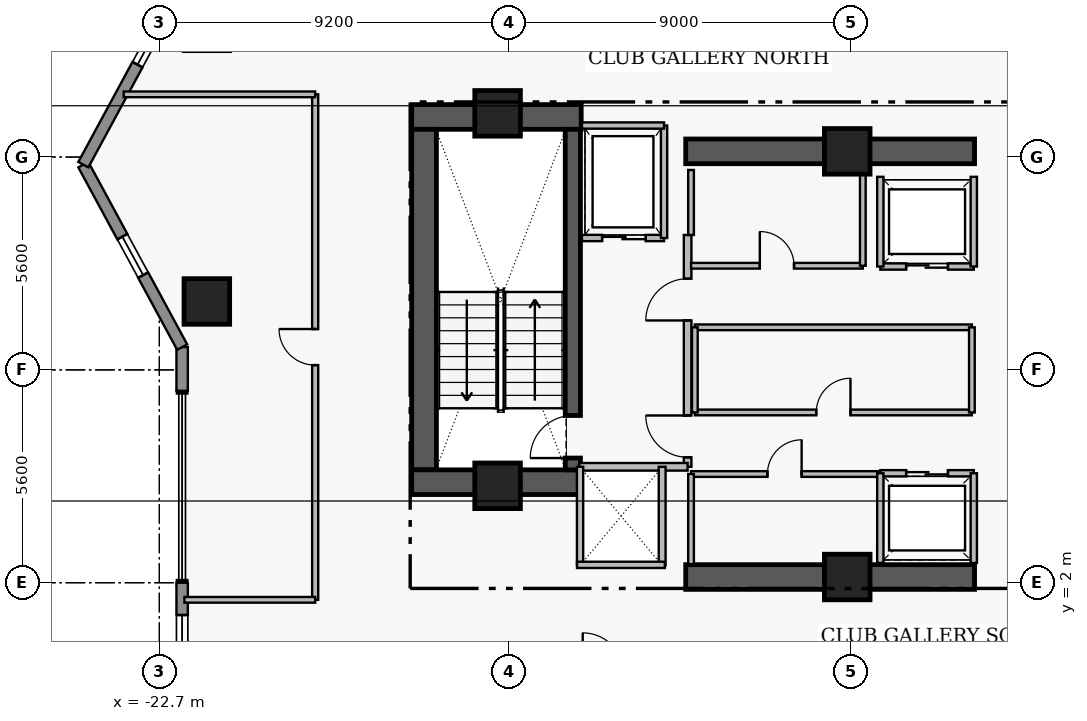
"""IFC4 building model, lengths in metres.
Left out: names, types, materials, properties, quantities, classifications, styles, units other than length and angle.
Written with IfcOpenShell. Run it as: python <this file> out.ifc"""

import sys

from ifc_helpers import new_model, si_unit, direction, frame, frame_2d, origin, origin_2d, place, context, subcontext, project, spatial, rectangle, extrude, element, fill, save


model = new_model("IFC4")
c1 = context("Model", 3, precision=1e-05, world=origin(), true_north=direction((0.0, 1.0)))
c2 = subcontext(c1, "Body", "Model", "MODEL_VIEW")
j1 = project(units=[si_unit("LENGTHUNIT", "METRE"), si_unit("PLANEANGLEUNIT", "RADIAN")], contexts=[c1])
p1 = place(None, origin())
s1 = spatial("IfcSite", under=j1, at=p1, CompositionType="ELEMENT")
p2 = place(p1, origin())
s2 = spatial("IfcBuilding", under=s1, at=p2, CompositionType="ELEMENT")
p3 = place(p2, frame((0.0, 0.0, 214.9)))
s3 = spatial("IfcBuildingStorey", under=s2, at=p3, CompositionType="ELEMENT", Elevation=214.9)
p4 = place(p3, frame((-16.06, 14.255, 0.0), z_axis=(0.0, 0.0, 1.0), x_axis=(1.0, 0.0, 0.0)))
e1 = element("IfcWall", 1, at=p4, inside=s3, PredefinedType="SHEAR", context=c2, shape_type="SweptSolid", body=[
    extrude(rectangle(XDim=4.46, YDim=0.65, at=frame_2d((2.23, 0.0))), origin(), (0.0, 0.0, 1.0), 3.56),
])
p5 = place(p3, frame((-15.735, 4.97, 0.0), z_axis=(0.0, 0.0, 1.0), x_axis=(0.0, 1.0, 0.0)))
e2 = element("IfcWall", 2, at=p5, inside=s3, PredefinedType="SHEAR", context=c2, shape_type="SweptSolid", body=[
    extrude(rectangle(XDim=8.96, YDim=0.65, at=frame_2d((4.48, 0.0))), origin(), (0.0, 0.0, 1.0), 3.56),
])
p6 = place(p3, frame((-16.06, 4.645, 0.0), z_axis=(0.0, 0.0, 1.0), x_axis=(1.0, 0.0, 0.0)))
e3 = element("IfcWall", 3, at=p6, inside=s3, PredefinedType="SHEAR", context=c2, shape_type="SweptSolid", body=[
    extrude(rectangle(XDim=4.46, YDim=0.65, at=frame_2d((2.23, 0.0))), origin(), (0.0, 0.0, 1.0), 3.56),
])
for number, where, z_axis, x_axis in (
    (4, (-8.85, 2.15, 0.0), (0.0, 0.0, 1.0), (1.0, 0.0, 0.0)),
    (5, (-8.85, 13.35, 0.0), (0.0, 0.0, 1.0), (1.0, 0.0, 0.0)),
):
    element("IfcWall", number, at=place(p3, frame(where, z_axis=z_axis, x_axis=x_axis)), inside=s3, PredefinedType="SHEAR", context=c2, shape_type="SweptSolid", body=[
        extrude(rectangle(XDim=7.6, YDim=0.65, at=frame_2d((3.8, 0.0))), origin(), (0.0, 0.0, 1.0), 3.53),
    ])
p7 = place(p3, frame((-11.82, 4.97, 0.0), z_axis=(0.0, 0.0, 1.0), x_axis=(0.0, 1.0, 0.0)))
e6 = element("IfcWall", 6, at=p7, inside=s3, PredefinedType="SHEAR", context=c2, shape_type="SweptSolid", body=[
    extrude(rectangle(XDim=8.96, YDim=0.4, at=frame_2d((4.48, 0.0))), origin(), (0.0, 0.0, 1.0), 3.56),
])
p8 = place(p7, frame((0.31, 0.0, 0.0)))
e7 = element("IfcOpeningElement", 7, at=p8, cuts=e6, PredefinedType="OPENING", context=c2, shape_type="SweptSolid", body=[
    extrude(rectangle(XDim=1.12, YDim=2.22, at=frame_2d((0.56, 1.11))), frame((0.0, 0.21, 0.0), z_axis=(0.0, -1.0, 0.0), x_axis=(1.0, 0.0, 0.0)), (0.0, 0.0, 1.0), 0.42),
])
for number, where, z_axis, x_axis in (
    (8, (-13.8, 14.35, 0.0), (0.0, 0.0, 1.0), (1.0, 0.0, 0.0)),
    (9, (-4.6, 13.35, 0.0), (0.0, 0.0, 1.0), (1.0, 0.0, 0.0)),
    (10, (-13.8, 4.55, 0.0), (0.0, 0.0, 1.0), (1.0, 0.0, 0.0)),
    (11, (-4.6, 2.15, 0.0), (0.0, 0.0, 1.0), (1.0, 0.0, 0.0)),
    (12, (-21.45, 9.4, 0.0), (0.0, 0.0, 1.0), (1.0, 0.0, 0.0)),
):
    element("IfcColumn", number, at=place(p3, frame(where, z_axis=z_axis, x_axis=x_axis)), inside=s3, PredefinedType="COLUMN", context=c2, shape_type="SweptSolid", body=[
        extrude(rectangle(XDim=1.2, YDim=1.2, at=origin_2d()), origin(), (0.0, 0.0, 1.0), 3.75),
    ])
p9 = place(p3, frame((-22.1, -0.85, 0.0), z_axis=(0.0, 0.0, 1.0), x_axis=(0.0, 1.0, 0.0)))
e13 = element("IfcWall", 13, at=p9, inside=s3, PredefinedType="STANDARD", context=c2, shape_type="SweptSolid", body=[
    extrude(rectangle(XDim=2.85, YDim=0.3, at=frame_2d((1.425, 0.0))), origin(), (0.0, 0.0, 1.0), 3.53),
])
p10 = place(p9, frame((0.85, 0.0, 0.95)))
e14 = element("IfcOpeningElement", 14, at=p10, cuts=e13, PredefinedType="OPENING", context=c2, shape_type="SweptSolid", body=[
    extrude(rectangle(XDim=1.15, YDim=1.55, at=frame_2d((0.575, 0.775))), frame((0.0, 0.16, 0.0), z_axis=(0.0, -1.0, 0.0), x_axis=(1.0, 0.0, 0.0)), (0.0, 0.0, 1.0), 0.32),
])
p11 = place(p3, frame((-22.1, 7.05, 0.0), z_axis=(0.0, 0.0, 1.0), x_axis=(0.0, 1.0, 0.0)))
e15 = element("IfcWall", 15, at=p11, inside=s3, PredefinedType="STANDARD", context=c2, shape_type="SweptSolid", body=[
    extrude(rectangle(XDim=1.15, YDim=0.3, at=frame_2d((0.575, 0.0))), origin(), (0.0, 0.0, 1.0), 3.53),
])
p12 = place(p3, frame((-22.1, 8.2, 0.0), z_axis=(0.0, 0.0, 1.0), x_axis=(-0.476258655584, 0.879305233114, 0.0)))
e16 = element("IfcWall", 16, at=p12, inside=s3, PredefinedType="STANDARD", context=c2, shape_type="SweptSolid", body=[
    extrude(rectangle(XDim=5.459, YDim=0.3, at=frame_2d((2.729, 0.0))), origin(), (0.0, 0.0, 1.0), 3.53),
])
p13 = place(p12, frame((2.155, 0.0, 1.25)))
e17 = element("IfcOpeningElement", 17, at=p13, cuts=e16, PredefinedType="OPENING", context=c2, shape_type="SweptSolid", body=[
    extrude(rectangle(XDim=1.15, YDim=1.55, at=frame_2d((0.575, 0.775))), frame((0.0, 0.16, 0.0), z_axis=(0.0, -1.0, 0.0), x_axis=(1.0, 0.0, 0.0)), (0.0, 0.0, 1.0), 0.32),
])
p14 = place(p3, frame((-24.7, 13.0, 0.0), z_axis=(0.0, 0.0, 1.0), x_axis=(0.476258655584, 0.879305233114, 0.0)))
e18 = element("IfcWall", 18, at=p14, inside=s3, PredefinedType="STANDARD", context=c2, shape_type="SweptSolid", body=[
    extrude(rectangle(XDim=5.459, YDim=0.3, at=frame_2d((2.729, 0.0))), origin(), (0.0, 0.0, 1.0), 3.53),
])
p15 = place(p14, frame((2.993, 0.0, 1.25)))
e19 = element("IfcOpeningElement", 19, at=p15, cuts=e18, PredefinedType="OPENING", context=c2, shape_type="SweptSolid", body=[
    extrude(rectangle(XDim=1.15, YDim=1.55, at=frame_2d((0.575, 0.775))), frame((0.0, 0.16, 0.0), z_axis=(0.0, -1.0, 0.0), x_axis=(1.0, 0.0, 0.0)), (0.0, 0.0, 1.0), 0.32),
])
p16 = place(p3, frame((-8.8, 5.05, 0.0), z_axis=(0.0, 0.0, 1.0), x_axis=(0.0, 1.0, 0.0)))
e20 = element("IfcWall", 20, at=p16, inside=s3, PredefinedType="PARTITIONING", context=c2, shape_type="SweptSolid", body=[
    extrude(rectangle(XDim=6.1, YDim=0.2, at=frame_2d((3.05, 0.0))), origin(), (0.0, 0.0, 1.0), 3.53),
])
p17 = place(p16, frame((0.25, 0.0, 0.0)))
e21 = element("IfcOpeningElement", 21, at=p17, cuts=e20, PredefinedType="OPENING", context=c2, shape_type="SweptSolid", body=[
    extrude(rectangle(XDim=1.1, YDim=2.2, at=frame_2d((0.55, 1.1))), frame((0.0, 0.11, 0.0), z_axis=(0.0, -1.0, 0.0), x_axis=(1.0, 0.0, 0.0)), (0.0, 0.0, 1.0), 0.22),
])
p18 = place(p16, frame((3.85, 0.0, 0.0)))
e22 = element("IfcOpeningElement", 22, at=p18, cuts=e20, PredefinedType="OPENING", context=c2, shape_type="SweptSolid", body=[
    extrude(rectangle(XDim=1.1, YDim=2.2, at=frame_2d((0.55, 1.1))), frame((0.0, 0.11, 0.0), z_axis=(0.0, -1.0, 0.0), x_axis=(1.0, 0.0, 0.0)), (0.0, 0.0, 1.0), 0.22),
])
p19 = place(p3, frame((-11.58, 11.07, 0.0), z_axis=(0.0, 0.0, 1.0), x_axis=(1.0, 0.0, 0.0)))
e23 = element("IfcWall", 23, at=p19, inside=s3, PredefinedType="PARTITIONING", context=c2, shape_type="SweptSolid", body=[
    extrude(rectangle(XDim=2.16, YDim=0.165, at=frame_2d((1.08, 0.0))), origin(), (0.0, 0.0, 1.0), 3.53),
])
p20 = place(p19, frame((0.53, 0.0, 0.0)))
e24 = element("IfcOpeningElement", 24, at=p20, cuts=e23, PredefinedType="OPENING", context=c2, shape_type="SweptSolid", body=[
    extrude(rectangle(XDim=1.15, YDim=2.25, at=frame_2d((0.575, 1.125))), frame((0.0, 0.093, 0.0), z_axis=(0.0, -1.0, 0.0), x_axis=(1.0, 0.0, 0.0)), (0.0, 0.0, 1.0), 0.185),
])
p21 = place(p3, frame((-3.73, 4.88, 0.0), z_axis=(0.0, 0.0, 1.0), x_axis=(1.0, 0.0, 0.0)))
e25 = element("IfcWall", 25, at=p21, inside=s3, PredefinedType="PARTITIONING", context=c2, shape_type="SweptSolid", body=[
    extrude(rectangle(XDim=2.46, YDim=0.165, at=frame_2d((1.23, 0.0))), origin(), (0.0, 0.0, 1.0), 3.53),
])
p22 = place(p21, frame((0.68, 0.0, 0.0)))
e26 = element("IfcOpeningElement", 26, at=p22, cuts=e25, PredefinedType="OPENING", context=c2, shape_type="SweptSolid", body=[
    extrude(rectangle(XDim=1.1, YDim=2.25, at=frame_2d((0.55, 1.125))), frame((0.0, 0.093, 0.0), z_axis=(0.0, -1.0, 0.0), x_axis=(1.0, 0.0, 0.0)), (0.0, 0.0, 1.0), 0.185),
])
p23 = place(p3, frame((-3.73, 10.32, 0.0), z_axis=(0.0, 0.0, 1.0), x_axis=(1.0, 0.0, 0.0)))
e27 = element("IfcWall", 27, at=p23, inside=s3, PredefinedType="PARTITIONING", context=c2, shape_type="SweptSolid", body=[
    extrude(rectangle(XDim=2.46, YDim=0.165, at=frame_2d((1.23, 0.0))), origin(), (0.0, 0.0, 1.0), 3.53),
])
p24 = place(p23, frame((0.68, 0.0, 0.0)))
e28 = element("IfcOpeningElement", 28, at=p24, cuts=e27, PredefinedType="OPENING", context=c2, shape_type="SweptSolid", body=[
    extrude(rectangle(XDim=1.1, YDim=2.25, at=frame_2d((0.55, 1.125))), frame((0.0, 0.093, 0.0), z_axis=(0.0, -1.0, 0.0), x_axis=(1.0, 0.0, 0.0)), (0.0, 0.0, 1.0), 0.185),
])
p25 = place(p3, frame((-8.71, 4.86, 0.0), z_axis=(0.0, 0.0, 1.0), x_axis=(1.0, 0.0, 0.0)))
e29 = element("IfcWall", 29, at=p25, inside=s3, PredefinedType="PARTITIONING", context=c2, shape_type="SweptSolid", body=[
    extrude(rectangle(XDim=4.92, YDim=0.15, at=frame_2d((2.46, 0.0))), origin(), (0.0, 0.0, 1.0), 3.53),
])
p26 = place(p25, frame((2.01, 0.0, 0.0)))
e30 = element("IfcOpeningElement", 30, at=p26, cuts=e29, PredefinedType="OPENING", context=c2, shape_type="SweptSolid", body=[
    extrude(rectangle(XDim=0.9, YDim=2.15, at=frame_2d((0.45, 1.075))), frame((0.0, 0.085, 0.0), z_axis=(0.0, -1.0, 0.0), x_axis=(1.0, 0.0, 0.0)), (0.0, 0.0, 1.0), 0.17),
])
p27 = place(p3, frame((-8.71, 10.34, 0.0), z_axis=(0.0, 0.0, 1.0), x_axis=(1.0, 0.0, 0.0)))
e31 = element("IfcWall", 31, at=p27, inside=s3, PredefinedType="PARTITIONING", context=c2, shape_type="SweptSolid", body=[
    extrude(rectangle(XDim=4.52, YDim=0.15, at=frame_2d((2.26, 0.0))), origin(), (0.0, 0.0, 1.0), 3.53),
])
p28 = place(p27, frame((1.81, 0.0, 0.0)))
e32 = element("IfcOpeningElement", 32, at=p28, cuts=e31, PredefinedType="OPENING", context=c2, shape_type="SweptSolid", body=[
    extrude(rectangle(XDim=0.9, YDim=2.15, at=frame_2d((0.45, 1.075))), frame((0.0, 0.085, 0.0), z_axis=(0.0, -1.0, 0.0), x_axis=(1.0, 0.0, 0.0)), (0.0, 0.0, 1.0), 0.17),
])
p29 = place(p3, frame((-8.61, 6.48, 0.0), z_axis=(0.0, 0.0, 1.0), x_axis=(1.0, 0.0, 0.0)))
e33 = element("IfcWall", 33, at=p29, inside=s3, PredefinedType="PARTITIONING", context=c2, shape_type="SweptSolid", body=[
    extrude(rectangle(XDim=7.29, YDim=0.15, at=frame_2d((3.645, 0.0))), origin(), (0.0, 0.0, 1.0), 3.53),
])
p30 = place(p29, frame((3.195, 0.0, 0.0)))
e34 = element("IfcOpeningElement", 34, at=p30, cuts=e33, PredefinedType="OPENING", context=c2, shape_type="SweptSolid", body=[
    extrude(rectangle(XDim=0.9, YDim=2.15, at=frame_2d((0.45, 1.075))), frame((0.0, 0.085, 0.0), z_axis=(0.0, -1.0, 0.0), x_axis=(1.0, 0.0, 0.0)), (0.0, 0.0, 1.0), 0.17),
])
p31 = place(p3, frame((-18.6, 1.55, 0.0), z_axis=(0.0, 0.0, 1.0), x_axis=(0.0, 1.0, 0.0)))
e35 = element("IfcWall", 35, at=p31, inside=s3, PredefinedType="PARTITIONING", context=c2, shape_type="SweptSolid", body=[
    extrude(rectangle(XDim=13.3, YDim=0.16, at=frame_2d((6.65, 0.0))), origin(), (0.0, 0.0, 1.0), 3.53),
])
p32 = place(p31, frame((6.175, 0.0, 0.0)))
e36 = element("IfcOpeningElement", 36, at=p32, cuts=e35, PredefinedType="OPENING", context=c2, shape_type="SweptSolid", body=[
    extrude(rectangle(XDim=0.95, YDim=2.15, at=frame_2d((0.475, 1.075))), frame((0.0, 0.09, 0.0), z_axis=(0.0, -1.0, 0.0), x_axis=(1.0, 0.0, 0.0)), (0.0, 0.0, 1.0), 0.18),
])
p33 = place(p3, frame((-11.65, 5.05, 0.0), z_axis=(0.0, 0.0, 1.0), x_axis=(1.0, 0.0, 0.0)))
e37 = element("IfcWall", 37, at=p33, inside=s3, PredefinedType="PARTITIONING", context=c2, shape_type="SweptSolid", body=[
    extrude(rectangle(XDim=2.85, YDim=0.2, at=frame_2d((1.425, 0.0))), origin(), (0.0, 0.0, 1.0), 3.53),
])
p34 = place(p3, frame((-9.42, 11.07, 0.0), z_axis=(0.0, 0.0, 1.0), x_axis=(0.0, 1.0, 0.0)))
e38 = element("IfcWall", 38, at=p34, inside=s3, PredefinedType="PARTITIONING", context=c2, shape_type="SweptSolid", body=[
    extrude(rectangle(XDim=2.96, YDim=0.165, at=frame_2d((1.48, 0.0))), origin(), (0.0, 0.0, 1.0), 3.53),
])
p35 = place(p3, frame((-11.58, 14.03, 0.0), z_axis=(0.0, 0.0, 1.0), x_axis=(1.0, 0.0, 0.0)))
e39 = element("IfcWall", 39, at=p35, inside=s3, PredefinedType="PARTITIONING", context=c2, shape_type="SweptSolid", body=[
    extrude(rectangle(XDim=2.16, YDim=0.165, at=frame_2d((1.08, 0.0))), origin(), (0.0, 0.0, 1.0), 3.53),
])
for number, where, z_axis, x_axis in (
    (40, (-3.73, 2.52, 0.0), (0.0, 0.0, 1.0), (0.0, 1.0, 0.0)),
    (41, (-1.27, 2.52, 0.0), (0.0, 0.0, 1.0), (0.0, 1.0, 0.0)),
    (42, (-3.73, 10.32, 0.0), (0.0, 0.0, 1.0), (0.0, 1.0, 0.0)),
    (43, (-1.27, 10.32, 0.0), (0.0, 0.0, 1.0), (0.0, 1.0, 0.0)),
):
    element("IfcWall", number, at=place(p3, frame(where, z_axis=z_axis, x_axis=x_axis)), inside=s3, PredefinedType="PARTITIONING", context=c2, shape_type="SweptSolid", body=[
        extrude(rectangle(XDim=2.36, YDim=0.165, at=frame_2d((1.18, 0.0))), origin(), (0.0, 0.0, 1.0), 3.53),
    ])
p36 = place(p3, frame((-8.71, 2.49, 0.0), z_axis=(0.0, 0.0, 1.0), x_axis=(0.0, 1.0, 0.0)))
e44 = element("IfcWall", 44, at=p36, inside=s3, PredefinedType="PARTITIONING", context=c2, shape_type="SweptSolid", body=[
    extrude(rectangle(XDim=2.37, YDim=0.15, at=frame_2d((1.185, 0.0))), origin(), (0.0, 0.0, 1.0), 3.53),
])
p37 = place(p3, frame((-8.71, 11.15, 0.0), z_axis=(0.0, 0.0, 1.0), x_axis=(0.0, 1.0, 0.0)))
e45 = element("IfcWall", 45, at=p37, inside=s3, PredefinedType="PARTITIONING", context=c2, shape_type="SweptSolid", body=[
    extrude(rectangle(XDim=1.71, YDim=0.15, at=frame_2d((0.855, 0.0))), origin(), (0.0, 0.0, 1.0), 3.53),
])
p38 = place(p3, frame((-4.19, 10.34, 0.0), z_axis=(0.0, 0.0, 1.0), x_axis=(0.0, 1.0, 0.0)))
e46 = element("IfcWall", 46, at=p38, inside=s3, PredefinedType="PARTITIONING", context=c2, shape_type="SweptSolid", body=[
    extrude(rectangle(XDim=2.52, YDim=0.15, at=frame_2d((1.26, 0.0))), origin(), (0.0, 0.0, 1.0), 3.53),
])
p39 = place(p3, frame((-9.47, 2.45, 0.0), z_axis=(0.0, 0.0, 1.0), x_axis=(0.0, 1.0, 0.0)))
e47 = element("IfcWall", 47, at=p39, inside=s3, PredefinedType="PARTITIONING", context=c2, shape_type="SweptSolid", body=[
    extrude(rectangle(XDim=2.6, YDim=0.18, at=frame_2d((1.3, 0.0))), origin(), (0.0, 0.0, 1.0), 3.53),
])
p40 = place(p3, frame((-11.63, 2.47, 0.0), z_axis=(0.0, 0.0, 1.0), x_axis=(0.0, 1.0, 0.0)))
e48 = element("IfcWall", 48, at=p40, inside=s3, PredefinedType="PARTITIONING", context=c2, shape_type="SweptSolid", body=[
    extrude(rectangle(XDim=2.58, YDim=0.165, at=frame_2d((1.29, 0.0))), origin(), (0.0, 0.0, 1.0), 3.53),
])
p41 = place(p3, frame((-11.71, 2.47, 0.0), z_axis=(0.0, 0.0, 1.0), x_axis=(1.0, 0.0, 0.0)))
e49 = element("IfcWall", 49, at=p41, inside=s3, PredefinedType="PARTITIONING", context=c2, shape_type="SweptSolid", body=[
    extrude(rectangle(XDim=2.31, YDim=0.165, at=frame_2d((1.155, 0.0))), origin(), (0.0, 0.0, 1.0), 2.43),
])
p42 = place(p3, frame((-8.61, 8.72, 0.0), z_axis=(0.0, 0.0, 1.0), x_axis=(1.0, 0.0, 0.0)))
e50 = element("IfcWall", 50, at=p42, inside=s3, PredefinedType="PARTITIONING", context=c2, shape_type="SweptSolid", body=[
    extrude(rectangle(XDim=7.29, YDim=0.15, at=frame_2d((3.645, 0.0))), origin(), (0.0, 0.0, 1.0), 3.53),
])
for number, where, z_axis, x_axis in (
    (51, (-8.61, 6.48, 0.0), (0.0, 0.0, 1.0), (0.0, 1.0, 0.0)),
    (52, (-1.32, 6.48, 0.0), (0.0, 0.0, 1.0), (0.0, 1.0, 0.0)),
):
    element("IfcWall", number, at=place(p3, frame(where, z_axis=z_axis, x_axis=x_axis)), inside=s3, PredefinedType="PARTITIONING", context=c2, shape_type="SweptSolid", body=[
        extrude(rectangle(XDim=2.24, YDim=0.15, at=frame_2d((1.12, 0.0))), origin(), (0.0, 0.0, 1.0), 3.53),
    ])
p43 = place(p3, frame((-22.04, 1.55, 0.0), z_axis=(0.0, 0.0, 1.0), x_axis=(1.0, 0.0, 0.0)))
e53 = element("IfcWall", 53, at=p43, inside=s3, PredefinedType="PARTITIONING", context=c2, shape_type="SweptSolid", body=[
    extrude(rectangle(XDim=3.44, YDim=0.15, at=frame_2d((1.72, 0.0))), origin(), (0.0, 0.0, 1.0), 3.53),
])
p44 = place(p3, frame((-23.638, 14.85, 0.0), z_axis=(0.0, 0.0, 1.0), x_axis=(1.0, 0.0, 0.0)))
e54 = element("IfcWall", 54, at=p44, inside=s3, PredefinedType="PARTITIONING", context=c2, shape_type="SweptSolid", body=[
    extrude(rectangle(XDim=5.038, YDim=0.15, at=frame_2d((2.519, 0.0))), origin(), (0.0, 0.0, 1.0), 3.53),
])
p45 = place(p10, origin())
e55 = element("IfcWindow", 55, at=p45, inside=s3, PartitioningType="SINGLE_PANEL", PredefinedType="WINDOW", context=c2, shape_type="SweptSolid", body=[
    extrude(rectangle(XDim=1.15, YDim=1.55, at=frame_2d((0.575, 0.775))), frame((0.0, 0.03, 0.0), z_axis=(0.0, -1.0, 0.0), x_axis=(1.0, 0.0, 0.0)), (0.0, 0.0, 1.0), 0.06),
])
fill(e14, e55)
p46 = place(p13, origin())
e56 = element("IfcWindow", 56, at=p46, inside=s3, PartitioningType="SINGLE_PANEL", PredefinedType="WINDOW", context=c2, shape_type="SweptSolid", body=[
    extrude(rectangle(XDim=1.15, YDim=1.55, at=frame_2d((0.575, 0.775))), frame((0.0, 0.03, 0.0), z_axis=(0.0, -1.0, 0.0), x_axis=(1.0, 0.0, 0.0)), (0.0, 0.0, 1.0), 0.06),
])
fill(e17, e56)
p47 = place(p15, origin())
e57 = element("IfcWindow", 57, at=p47, inside=s3, PartitioningType="SINGLE_PANEL", PredefinedType="WINDOW", context=c2, shape_type="SweptSolid", body=[
    extrude(rectangle(XDim=1.15, YDim=1.55, at=frame_2d((0.575, 0.775))), frame((0.0, 0.03, 0.0), z_axis=(0.0, -1.0, 0.0), x_axis=(1.0, 0.0, 0.0)), (0.0, 0.0, 1.0), 0.06),
])
fill(e19, e57)
p48 = place(p8, origin())
e58 = element("IfcDoor", 58, at=p48, inside=s3, OperationType="SINGLE_SWING_LEFT", PredefinedType="DOOR", context=c2, shape_type="SweptSolid", body=[
    extrude(rectangle(XDim=1.12, YDim=2.22, at=frame_2d((0.56, 1.11))), frame((0.0, 0.025, 0.0), z_axis=(0.0, -1.0, 0.0), x_axis=(1.0, 0.0, 0.0)), (0.0, 0.0, 1.0), 0.05),
])
fill(e7, e58)
p49 = place(p17, origin())
e59 = element("IfcDoor", 59, at=p49, inside=s3, OperationType="SINGLE_SWING_RIGHT", PredefinedType="DOOR", context=c2, shape_type="SweptSolid", body=[
    extrude(rectangle(XDim=1.1, YDim=2.2, at=frame_2d((0.55, 1.1))), frame((0.0, 0.025, 0.0), z_axis=(0.0, -1.0, 0.0), x_axis=(1.0, 0.0, 0.0)), (0.0, 0.0, 1.0), 0.05),
])
fill(e21, e59)
p50 = place(p18, origin())
e60 = element("IfcDoor", 60, at=p50, inside=s3, OperationType="SINGLE_SWING_LEFT", PredefinedType="DOOR", context=c2, shape_type="SweptSolid", body=[
    extrude(rectangle(XDim=1.1, YDim=2.2, at=frame_2d((0.55, 1.1))), frame((0.0, 0.025, 0.0), z_axis=(0.0, -1.0, 0.0), x_axis=(1.0, 0.0, 0.0)), (0.0, 0.0, 1.0), 0.05),
])
fill(e22, e60)
p51 = place(p20, origin())
e61 = element("IfcDoor", 61, at=p51, inside=s3, OperationType="SLIDING_TO_LEFT", PredefinedType="DOOR", context=c2, shape_type="SweptSolid", body=[
    extrude(rectangle(XDim=1.15, YDim=2.25, at=frame_2d((0.575, 1.125))), frame((0.0, 0.025, 0.0), z_axis=(0.0, -1.0, 0.0), x_axis=(1.0, 0.0, 0.0)), (0.0, 0.0, 1.0), 0.05),
])
fill(e24, e61)
p52 = place(p22, origin())
e62 = element("IfcDoor", 62, at=p52, inside=s3, OperationType="SLIDING_TO_LEFT", PredefinedType="DOOR", context=c2, shape_type="SweptSolid", body=[
    extrude(rectangle(XDim=1.1, YDim=2.25, at=frame_2d((0.55, 1.125))), frame((0.0, 0.025, 0.0), z_axis=(0.0, -1.0, 0.0), x_axis=(1.0, 0.0, 0.0)), (0.0, 0.0, 1.0), 0.05),
])
fill(e26, e62)
p53 = place(p24, origin())
e63 = element("IfcDoor", 63, at=p53, inside=s3, OperationType="SLIDING_TO_LEFT", PredefinedType="DOOR", context=c2, shape_type="SweptSolid", body=[
    extrude(rectangle(XDim=1.1, YDim=2.25, at=frame_2d((0.55, 1.125))), frame((0.0, 0.025, 0.0), z_axis=(0.0, -1.0, 0.0), x_axis=(1.0, 0.0, 0.0)), (0.0, 0.0, 1.0), 0.05),
])
fill(e28, e63)
p54 = place(p26, origin())
e64 = element("IfcDoor", 64, at=p54, inside=s3, OperationType="SINGLE_SWING_RIGHT", PredefinedType="DOOR", context=c2, shape_type="SweptSolid", body=[
    extrude(rectangle(XDim=0.9, YDim=2.15, at=frame_2d((0.45, 1.075))), frame((0.0, 0.025, 0.0), z_axis=(0.0, -1.0, 0.0), x_axis=(1.0, 0.0, 0.0)), (0.0, 0.0, 1.0), 0.05),
])
fill(e30, e64)
p55 = place(p28, origin())
e65 = element("IfcDoor", 65, at=p55, inside=s3, OperationType="SINGLE_SWING_LEFT", PredefinedType="DOOR", context=c2, shape_type="SweptSolid", body=[
    extrude(rectangle(XDim=0.9, YDim=2.15, at=frame_2d((0.45, 1.075))), frame((0.0, 0.025, 0.0), z_axis=(0.0, -1.0, 0.0), x_axis=(1.0, 0.0, 0.0)), (0.0, 0.0, 1.0), 0.05),
])
fill(e32, e65)
p56 = place(p30, origin())
e66 = element("IfcDoor", 66, at=p56, inside=s3, OperationType="SINGLE_SWING_RIGHT", PredefinedType="DOOR", context=c2, shape_type="SweptSolid", body=[
    extrude(rectangle(XDim=0.9, YDim=2.15, at=frame_2d((0.45, 1.075))), frame((0.0, 0.025, 0.0), z_axis=(0.0, -1.0, 0.0), x_axis=(1.0, 0.0, 0.0)), (0.0, 0.0, 1.0), 0.05),
])
fill(e34, e66)
p57 = place(p32, origin())
e67 = element("IfcDoor", 67, at=p57, inside=s3, OperationType="SINGLE_SWING_RIGHT", PredefinedType="DOOR", context=c2, shape_type="SweptSolid", body=[
    extrude(rectangle(XDim=0.95, YDim=2.15, at=frame_2d((0.475, 1.075))), frame((0.0, 0.025, 0.0), z_axis=(0.0, -1.0, 0.0), x_axis=(1.0, 0.0, 0.0)), (0.0, 0.0, 1.0), 0.05),
])
fill(e36, e67)
save(model, sys.argv[1])
